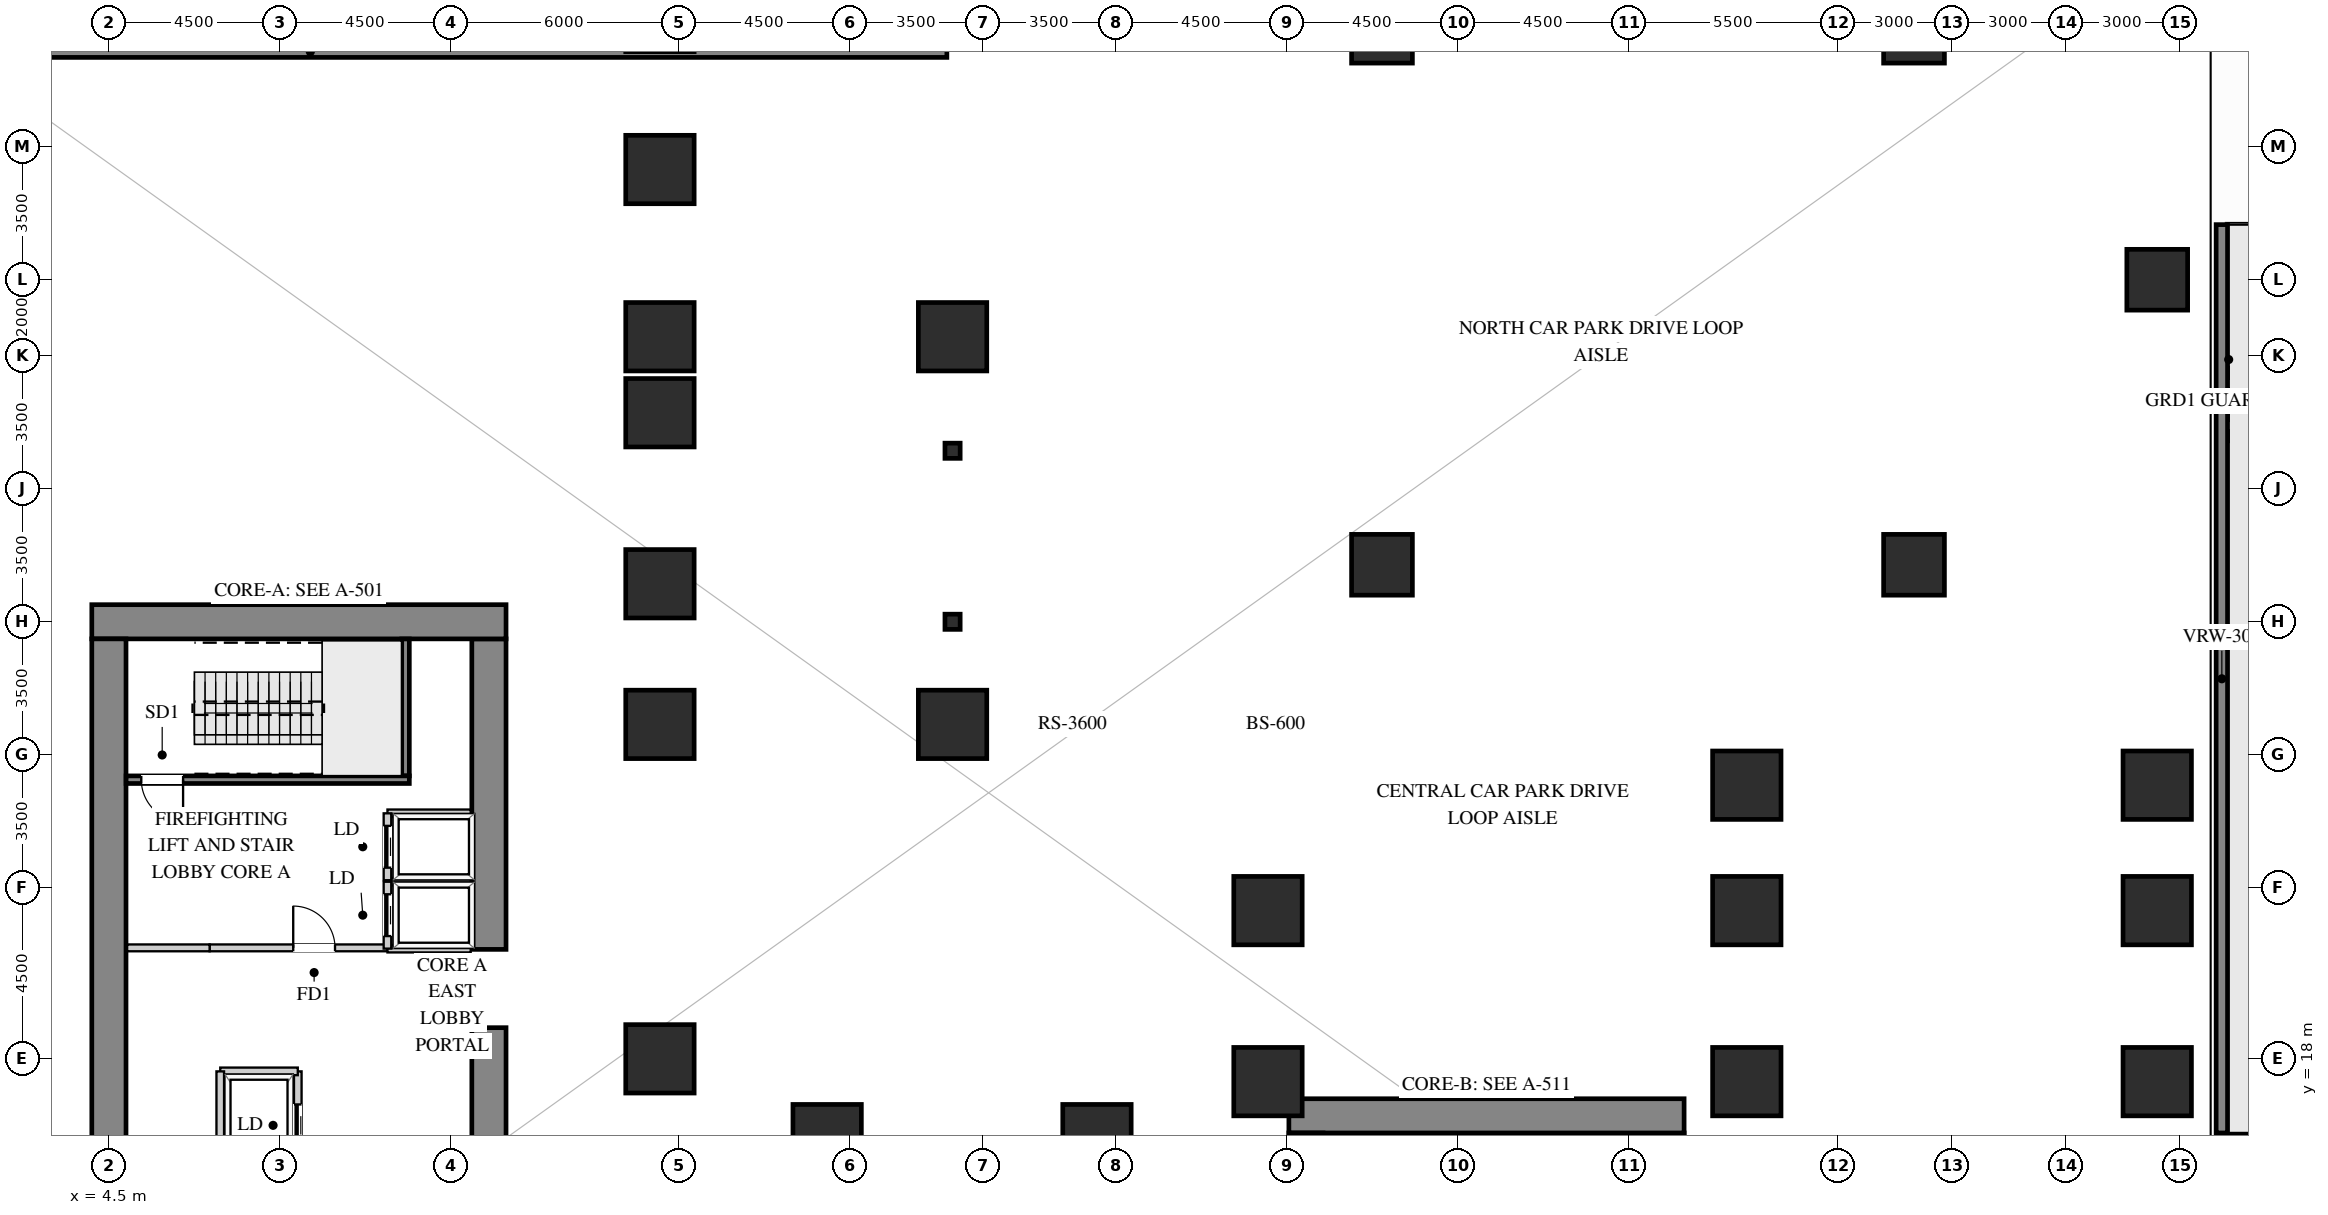
"""IFC4 building model, lengths in metres.
Left out: names, types, materials, properties, quantities, classifications, styles, units other than length and angle.
Written with IfcOpenShell. Run it as: python <this file> out.ifc"""

import sys

from ifc_helpers import new_model, si_unit, direction, frame, frame_2d, origin, origin_2d, place, context, subcontext, project, spatial, rectangle, hollow_rectangle, extrude, source, transform, mapped, element, fill, save


model = new_model("IFC4")
c1 = context("Model", 3, precision=1e-05, world=origin(), true_north=direction((0.0, 1.0)))
c2 = subcontext(c1, "Body", "Model", "MODEL_VIEW")
j1 = project(units=[si_unit("LENGTHUNIT", "METRE"), si_unit("PLANEANGLEUNIT", "RADIAN")], contexts=[c1])
p1 = place(None, origin())
s1 = spatial("IfcSite", under=j1, at=p1, CompositionType="ELEMENT")
p2 = place(p1, origin())
s2 = spatial("IfcBuilding", under=s1, at=p2, CompositionType="ELEMENT")
p3 = place(p2, frame((0.0, 0.0, -9.0)))
s3 = spatial("IfcBuildingStorey", under=s2, at=p3, CompositionType="ELEMENT", Elevation=-9.0)
m1 = source(origin(), c2, "Body", "SweptSolid", [
    extrude(rectangle(XDim=1.6, YDim=1.6, at=origin_2d()), origin(), (0.0, 0.0, 1.0), 4.2),
])
for number, where, z_axis, x_axis in (
    (1, (38.0, 31.0, 0.0), (0.0, 0.0, 1.0), (1.0, 0.0, 0.0)),
    (2, (52.0, 31.0, 0.0), (0.0, 0.0, 1.0), (1.0, 0.0, 0.0)),
    (3, (38.0, 45.0, 0.0), (0.0, 0.0, 1.0), (1.0, 0.0, 0.0)),
    (4, (52.0, 45.0, 0.0), (0.0, 0.0, 1.0), (1.0, 0.0, 0.0)),
    (5, (58.4, 38.5, 0.0), (0.0, 0.0, 1.0), (1.0, 0.0, 0.0)),
):
    element("IfcColumn", number, at=place(p3, frame(where, z_axis=z_axis, x_axis=x_axis)), inside=s3, PredefinedType="COLUMN", context=c2, shape_type="MappedRepresentation", body=[
        mapped(m1, transform((0.0, 0.0, 0.0), x_axis=(1.0, 0.0, 0.0), y_axis=(0.0, 1.0, 0.0), z_axis=(0.0, 0.0, 1.0))),
    ])
m2 = source(origin(), c2, "Body", "SweptSolid", [
    extrude(rectangle(XDim=1.8, YDim=1.8, at=origin_2d()), origin(), (0.0, 0.0, 1.0), 4.2),
])
for number, where, z_axis, x_axis in (
    (6, (26.7, 26.8, 0.0), (0.0, 0.0, 1.0), (1.0, 0.0, 0.0)),
    (7, (26.7, 37.0, 0.0), (0.0, 0.0, 1.0), (1.0, 0.0, 0.0)),
    (8, (58.4, 17.4, 0.0), (0.0, 0.0, 1.0), (1.0, 0.0, 0.0)),
    (9, (58.4, 21.9, 0.0), (0.0, 0.0, 1.0), (1.0, 0.0, 0.0)),
    (10, (58.4, 25.2, 0.0), (0.0, 0.0, 1.0), (1.0, 0.0, 0.0)),
    (11, (47.6, 17.4, 0.0), (0.0, 0.0, 1.0), (1.0, 0.0, 0.0)),
    (12, (47.6, 21.9, 0.0), (0.0, 0.0, 1.0), (1.0, 0.0, 0.0)),
    (13, (47.6, 25.2, 0.0), (0.0, 0.0, 1.0), (1.0, 0.0, 0.0)),
    (14, (19.0, 18.0, 0.0), (0.0, 0.0, 1.0), (1.0, 0.0, 0.0)),
    (15, (19.0, 26.8, 0.0), (0.0, 0.0, 1.0), (1.0, 0.0, 0.0)),
    (16, (19.0, 30.5, 0.0), (0.0, 0.0, 1.0), (1.0, 0.0, 0.0)),
    (17, (19.0, 35.0, 0.0), (0.0, 0.0, 1.0), (1.0, 0.0, 0.0)),
    (18, (19.0, 37.0, 0.0), (0.0, 0.0, 1.0), (1.0, 0.0, 0.0)),
    (19, (19.0, 41.4, 0.0), (0.0, 0.0, 1.0), (1.0, 0.0, 0.0)),
    (20, (19.0, 45.4, 0.0), (0.0, 0.0, 1.0), (1.0, 0.0, 0.0)),
    (21, (35.0, 17.4, 0.0), (0.0, 0.0, 1.0), (1.0, 0.0, 0.0)),
    (22, (35.0, 21.9, 0.0), (0.0, 0.0, 1.0), (1.0, 0.0, 0.0)),
    (23, (23.4, 15.9, 0.0), (0.0, 0.0, 1.0), (1.0, 0.0, 0.0)),
    (24, (30.5, 15.9, 0.0), (0.0, 0.0, 1.0), (1.0, 0.0, 0.0)),
):
    element("IfcColumn", number, at=place(p3, frame(where, z_axis=z_axis, x_axis=x_axis)), inside=s3, PredefinedType="COLUMN", context=c2, shape_type="MappedRepresentation", body=[
        mapped(m2, transform((0.0, 0.0, 0.0), x_axis=(1.0, 0.0, 0.0), y_axis=(0.0, 1.0, 0.0), z_axis=(0.0, 0.0, 1.0))),
    ])
m3 = source(origin(), c2, "Body", "SweptSolid", [
    extrude(hollow_rectangle(XDim=0.4, YDim=0.4, WallThickness=0.02, at=origin_2d()), origin(), (0.0, 0.0, 1.0), 4.2),
])
for number, where, z_axis, x_axis in (
    (25, (26.7, 29.5, 0.0), (0.0, 0.0, 1.0), (1.0, 0.0, 0.0)),
    (26, (26.7, 34.0, 0.0), (0.0, 0.0, 1.0), (1.0, 0.0, 0.0)),
):
    element("IfcColumn", number, at=place(p3, frame(where, z_axis=z_axis, x_axis=x_axis)), inside=s3, PredefinedType="PILASTER", context=c2, shape_type="MappedRepresentation", body=[
        mapped(m3, transform((0.0, 0.0, 0.0), x_axis=(1.0, 0.0, 0.0), y_axis=(0.0, 1.0, 0.0), z_axis=(0.0, 0.0, 1.0))),
    ])
m4 = source(origin(), c2, "Body", "SweptSolid", [
    extrude(rectangle(XDim=9.87, YDim=0.9, at=frame_2d((4.935, 0.0))), origin(), (0.0, 0.0, 1.0), 4.2),
])
p4 = place(p3, frame((14.5, 8.95, 0.0), z_axis=(0.0, 0.0, 1.0), x_axis=(0.0, 1.0, 0.0)))
e27 = element("IfcWall", 27, at=p4, inside=s3, PredefinedType="SHEAR", context=c2, shape_type="MappedRepresentation", body=[
    mapped(m4, transform((0.0, 0.0, 0.0), x_axis=(1.0, 0.0, 0.0), y_axis=(0.0, 1.0, 0.0), z_axis=(0.0, 0.0, 1.0))),
])
m5 = source(origin(), c2, "Body", "SweptSolid", [
    extrude(rectangle(XDim=8.17, YDim=0.9, at=frame_2d((4.085, 0.0))), origin(), (0.0, 0.0, 1.0), 4.2),
])
p5 = place(p3, frame((14.5, 20.88, 0.0), z_axis=(0.0, 0.0, 1.0), x_axis=(0.0, 1.0, 0.0)))
e28 = element("IfcWall", 28, at=p5, inside=s3, PredefinedType="SHEAR", context=c2, shape_type="MappedRepresentation", body=[
    mapped(m5, transform((0.0, 0.0, 0.0), x_axis=(1.0, 0.0, 0.0), y_axis=(0.0, 1.0, 0.0), z_axis=(0.0, 0.0, 1.0))),
])
m6 = source(origin(), c2, "Body", "SweptSolid", [
    extrude(rectangle(XDim=10.9, YDim=0.9, at=frame_2d((5.45, 0.0))), origin(), (0.0, 0.0, 1.0), 4.2),
])
p6 = place(p3, frame((4.05, 29.5, 0.0), z_axis=(0.0, 0.0, 1.0), x_axis=(1.0, 0.0, 0.0)))
e29 = element("IfcWall", 29, at=p6, inside=s3, PredefinedType="SHEAR", context=c2, shape_type="MappedRepresentation", body=[
    mapped(m6, transform((0.0, 0.0, 0.0), x_axis=(1.0, 0.0, 0.0), y_axis=(0.0, 1.0, 0.0), z_axis=(0.0, 0.0, 1.0))),
])
m7 = source(origin(), c2, "Body", "SweptSolid", [
    extrude(rectangle(XDim=20.1, YDim=0.9, at=frame_2d((10.05, 0.0))), origin(), (0.0, 0.0, 1.0), 4.2),
])
p7 = place(p3, frame((4.5, 8.95, 0.0), z_axis=(0.0, 0.0, 1.0), x_axis=(0.0, 1.0, 0.0)))
e30 = element("IfcWall", 30, at=p7, inside=s3, PredefinedType="SHEAR", context=c2, shape_type="MappedRepresentation", body=[
    mapped(m7, transform((0.0, 0.0, 0.0), x_axis=(1.0, 0.0, 0.0), y_axis=(0.0, 1.0, 0.0), z_axis=(0.0, 0.0, 1.0))),
])
m8 = source(origin(), c2, "Body", "SweptSolid", [
    extrude(rectangle(XDim=3.65, YDim=0.9, at=frame_2d((1.825, 0.0))), origin(), (0.0, 0.0, 1.0), 4.2),
])
p8 = place(p3, frame((45.5, 12.4, 0.0), z_axis=(0.0, 0.0, 1.0), x_axis=(0.0, 1.0, 0.0)))
e31 = element("IfcWall", 31, at=p8, inside=s3, PredefinedType="SHEAR", context=c2, shape_type="MappedRepresentation", body=[
    mapped(m8, transform((0.0, 0.0, 0.0), x_axis=(1.0, 0.0, 0.0), y_axis=(0.0, 1.0, 0.0), z_axis=(0.0, 0.0, 1.0))),
])
m9 = source(origin(), c2, "Body", "SweptSolid", [
    extrude(rectangle(XDim=10.4, YDim=0.9, at=frame_2d((5.2, 0.0))), origin(), (0.0, 0.0, 1.0), 4.2),
])
p9 = place(p3, frame((35.55, 16.5, 0.0), z_axis=(0.0, 0.0, 1.0), x_axis=(1.0, 0.0, 0.0)))
e32 = element("IfcWall", 32, at=p9, inside=s3, PredefinedType="SHEAR", context=c2, shape_type="MappedRepresentation", body=[
    mapped(m9, transform((0.0, 0.0, 0.0), x_axis=(1.0, 0.0, 0.0), y_axis=(0.0, 1.0, 0.0), z_axis=(0.0, 0.0, 1.0))),
])
p10 = place(p3, frame((36.0, 12.4, 0.0), z_axis=(0.0, 0.0, 1.0), x_axis=(0.0, 1.0, 0.0)))
e33 = element("IfcWall", 33, at=p10, inside=s3, PredefinedType="SHEAR", context=c2, shape_type="MappedRepresentation", body=[
    mapped(m8, transform((0.0, 0.0, 0.0), x_axis=(1.0, 0.0, 0.0), y_axis=(0.0, 1.0, 0.0), z_axis=(0.0, 0.0, 1.0))),
])
p11 = place(p3, frame((7.15, 20.92, 0.0), z_axis=(0.0, 0.0, 1.0), x_axis=(1.0, 0.0, 0.0)))
e34 = element("IfcWall", 34, at=p11, inside=s3, PredefinedType="PARTITIONING", context=c2, shape_type="SweptSolid", body=[
    extrude(rectangle(XDim=4.68, YDim=0.18, at=frame_2d((2.34, 0.0))), origin(), (0.0, 0.0, 1.0), 4.185),
])
p12 = place(p11, frame((2.2, 0.0, 0.0)))
e35 = element("IfcOpeningElement", 35, at=p12, cuts=e34, PredefinedType="OPENING", context=c2, shape_type="SweptSolid", body=[
    extrude(rectangle(XDim=1.1, YDim=2.15, at=frame_2d((0.55, 1.075))), frame((0.0, 0.1, 0.0), z_axis=(0.0, -1.0, 0.0), x_axis=(1.0, 0.0, 0.0)), (0.0, 0.0, 1.0), 0.2),
])
m10 = source(origin(), c2, "Body", "SweptSolid", [
    extrude(rectangle(XDim=2.17, YDim=0.18, at=frame_2d((1.085, 0.0))), origin(), (0.0, 0.0, 1.0), 4.185),
])
p13 = place(p3, frame((4.98, 20.92, 0.0), z_axis=(0.0, 0.0, 1.0), x_axis=(1.0, 0.0, 0.0)))
e36 = element("IfcWall", 36, at=p13, inside=s3, PredefinedType="PARTITIONING", context=c2, shape_type="MappedRepresentation", body=[
    mapped(m10, transform((0.0, 0.0, 0.0), x_axis=(1.0, 0.0, 0.0), y_axis=(0.0, 1.0, 0.0), z_axis=(0.0, 0.0, 1.0))),
])
m11 = source(origin(), c2, "Body", "SweptSolid", [
    extrude(rectangle(XDim=2.19, YDim=0.2, at=frame_2d((1.095, 0.0))), origin(), (0.0, 0.0, 1.0), 4.185),
])
for number, where, z_axis, x_axis in (
    (37, (11.83, 22.66, 0.0), (0.0, 0.0, 1.0), (1.0, 0.0, 0.0)),
    (38, (11.83, 20.9, 0.0), (0.0, 0.0, 1.0), (1.0, 0.0, 0.0)),
):
    element("IfcWall", number, at=place(p3, frame(where, z_axis=z_axis, x_axis=x_axis)), inside=s3, PredefinedType="PARTITIONING", context=c2, shape_type="MappedRepresentation", body=[
        mapped(m11, transform((0.0, 0.0, 0.0), x_axis=(1.0, 0.0, 0.0), y_axis=(0.0, 1.0, 0.0), z_axis=(0.0, 0.0, 1.0))),
    ])
p14 = place(p3, frame((11.83, 20.9, 0.0), z_axis=(0.0, 0.0, 1.0), x_axis=(0.0, 1.0, 0.0)))
e39 = element("IfcWall", 39, at=p14, inside=s3, PredefinedType="PARTITIONING", context=c2, shape_type="SweptSolid", body=[
    extrude(rectangle(XDim=1.76, YDim=0.2, at=frame_2d((0.88, 0.0))), origin(), (0.0, 0.0, 1.0), 4.185),
])
p15 = place(p14, frame((0.33, 0.0, 0.0)))
e40 = element("IfcOpeningElement", 40, at=p15, cuts=e39, PredefinedType="OPENING", context=c2, shape_type="SweptSolid", body=[
    extrude(rectangle(XDim=1.1, YDim=2.2, at=frame_2d((0.55, 1.1))), frame((0.0, 0.11, 0.0), z_axis=(0.0, -1.0, 0.0), x_axis=(1.0, 0.0, 0.0)), (0.0, 0.0, 1.0), 0.22),
])
p16 = place(p3, frame((11.83, 24.46, 0.0), z_axis=(0.0, 0.0, 1.0), x_axis=(1.0, 0.0, 0.0)))
e41 = element("IfcWall", 41, at=p16, inside=s3, PredefinedType="PARTITIONING", context=c2, shape_type="MappedRepresentation", body=[
    mapped(m11, transform((0.0, 0.0, 0.0), x_axis=(1.0, 0.0, 0.0), y_axis=(0.0, 1.0, 0.0), z_axis=(0.0, 0.0, 1.0))),
])
p17 = place(p3, frame((11.83, 22.7, 0.0), z_axis=(0.0, 0.0, 1.0), x_axis=(0.0, 1.0, 0.0)))
e42 = element("IfcWall", 42, at=p17, inside=s3, PredefinedType="PARTITIONING", context=c2, shape_type="SweptSolid", body=[
    extrude(rectangle(XDim=1.76, YDim=0.2, at=frame_2d((0.88, 0.0))), origin(), (0.0, 0.0, 1.0), 4.185),
])
p18 = place(p17, frame((0.33, 0.0, 0.0)))
e43 = element("IfcOpeningElement", 43, at=p18, cuts=e42, PredefinedType="OPENING", context=c2, shape_type="SweptSolid", body=[
    extrude(rectangle(XDim=1.1, YDim=2.2, at=frame_2d((0.55, 1.1))), frame((0.0, 0.11, 0.0), z_axis=(0.0, -1.0, 0.0), x_axis=(1.0, 0.0, 0.0)), (0.0, 0.0, 1.0), 0.22),
])
p19 = place(p3, frame((9.47, 14.83, 0.0), z_axis=(0.0, 0.0, 1.0), x_axis=(0.0, 1.0, 0.0)))
e44 = element("IfcWall", 44, at=p19, inside=s3, PredefinedType="PARTITIONING", context=c2, shape_type="SweptSolid", body=[
    extrude(rectangle(XDim=2.84, YDim=0.2, at=frame_2d((1.42, 0.0))), origin(), (0.0, 0.0, 1.0), 4.185),
])
p20 = place(p19, frame((0.87, 0.0, 0.0)))
e45 = element("IfcOpeningElement", 45, at=p20, cuts=e44, PredefinedType="OPENING", context=c2, shape_type="SweptSolid", body=[
    extrude(rectangle(XDim=1.1, YDim=2.2, at=frame_2d((0.55, 1.1))), frame((0.0, 0.11, 0.0), z_axis=(0.0, -1.0, 0.0), x_axis=(1.0, 0.0, 0.0)), (0.0, 0.0, 1.0), 0.22),
])
m12 = source(origin(), c2, "Body", "SweptSolid", [
    extrude(rectangle(XDim=2.04, YDim=0.2, at=frame_2d((1.02, 0.0))), origin(), (0.0, 0.0, 1.0), 4.185),
])
p21 = place(p3, frame((7.43, 17.67, 0.0), z_axis=(0.0, 0.0, 1.0), x_axis=(1.0, 0.0, 0.0)))
e46 = element("IfcWall", 46, at=p21, inside=s3, PredefinedType="PARTITIONING", context=c2, shape_type="MappedRepresentation", body=[
    mapped(m12, transform((0.0, 0.0, 0.0), x_axis=(1.0, 0.0, 0.0), y_axis=(0.0, 1.0, 0.0), z_axis=(0.0, 0.0, 1.0))),
])
m13 = source(origin(), c2, "Body", "SweptSolid", [
    extrude(rectangle(XDim=2.84, YDim=0.2, at=frame_2d((1.42, 0.0))), origin(), (0.0, 0.0, 1.0), 4.185),
])
p22 = place(p3, frame((7.43, 14.83, 0.0), z_axis=(0.0, 0.0, 1.0), x_axis=(0.0, 1.0, 0.0)))
e47 = element("IfcWall", 47, at=p22, inside=s3, PredefinedType="PARTITIONING", context=c2, shape_type="MappedRepresentation", body=[
    mapped(m13, transform((0.0, 0.0, 0.0), x_axis=(1.0, 0.0, 0.0), y_axis=(0.0, 1.0, 0.0), z_axis=(0.0, 0.0, 1.0))),
])
m14 = source(origin(), c2, "Body", "SweptSolid", [
    extrude(rectangle(XDim=3.603, YDim=0.2, at=frame_2d((1.802, 0.0))), origin(), (0.0, 0.0, 1.0), 4.2),
])
p23 = place(p3, frame((12.305, 25.445, 0.0), z_axis=(0.0, 0.0, 1.0), x_axis=(0.0, 1.0, 0.0)))
e48 = element("IfcWall", 48, at=p23, inside=s3, PredefinedType="SHEAR", context=c2, shape_type="MappedRepresentation", body=[
    mapped(m14, transform((0.0, 0.0, 0.0), x_axis=(1.0, 0.0, 0.0), y_axis=(0.0, 1.0, 0.0), z_axis=(0.0, 0.0, 1.0))),
])
p24 = place(p3, frame((4.952, 25.345, 0.0), z_axis=(0.0, 0.0, 1.0), x_axis=(1.0, 0.0, 0.0)))
e49 = element("IfcWall", 49, at=p24, inside=s3, PredefinedType="SHEAR", context=c2, shape_type="SweptSolid", body=[
    extrude(rectangle(XDim=7.453, YDim=0.2, at=frame_2d((3.727, 0.0))), origin(), (0.0, 0.0, 1.0), 4.2),
])
p25 = place(p24, frame((0.4, 0.0, 0.0)))
e50 = element("IfcOpeningElement", 50, at=p25, cuts=e49, PredefinedType="OPENING", context=c2, shape_type="SweptSolid", body=[
    extrude(rectangle(XDim=1.1, YDim=2.15, at=frame_2d((0.55, 1.075))), frame((0.0, 0.11, 0.0), z_axis=(0.0, -1.0, 0.0), x_axis=(1.0, 0.0, 0.0)), (0.0, 0.0, 1.0), 0.22),
])
m15 = source(origin(), c2, "Body", "SweptSolid", [
    extrude(rectangle(XDim=23.9, YDim=0.3, at=frame_2d((11.95, 0.0))), origin(), (0.0, 0.0, 1.0), 4.2),
])
p26 = place(p3, frame((60.1, 16.05, 0.0), z_axis=(0.0, 0.0, 1.0), x_axis=(0.0, 1.0, 0.0)))
e51 = element("IfcWall", 51, at=p26, inside=s3, PredefinedType="SHEAR", context=c2, shape_type="MappedRepresentation", body=[
    mapped(m15, transform((0.0, 0.0, 0.0), x_axis=(1.0, 0.0, 0.0), y_axis=(0.0, 1.0, 0.0), z_axis=(0.0, 0.0, 1.0))),
])
m16 = source(origin(), c2, "Body", "SweptSolid", [
    extrude(rectangle(XDim=34.3, YDim=0.3, at=frame_2d((17.15, 0.0))), origin(), (0.0, 0.0, 1.0), 4.2),
])
p27 = place(p3, frame((-7.75, 44.5, 0.0), z_axis=(0.0, 0.0, 1.0), x_axis=(1.0, 0.0, 0.0)))
e52 = element("IfcWall", 52, at=p27, inside=s3, PredefinedType="SHEAR", context=c2, shape_type="MappedRepresentation", body=[
    mapped(m16, transform((0.0, 0.0, 0.0), x_axis=(1.0, 0.0, 0.0), y_axis=(0.0, 1.0, 0.0), z_axis=(0.0, 0.0, 1.0))),
])
m17 = source(origin(), c2, "Body", "SweptSolid", [
    extrude(rectangle(XDim=1.1, YDim=2.15, at=frame_2d((0.55, 1.075))), frame((0.0, 0.025, 0.0), z_axis=(0.0, -1.0, 0.0), x_axis=(1.0, 0.0, 0.0)), (0.0, 0.0, 1.0), 0.05),
])
p28 = place(p12, origin())
e53 = element("IfcDoor", 53, at=p28, inside=s3, OperationType="SINGLE_SWING_LEFT", PredefinedType="DOOR", context=c2, shape_type="MappedRepresentation", body=[
    mapped(m17, transform((0.0, 0.0, 0.0), x_axis=(1.0, 0.0, 0.0), y_axis=(0.0, 1.0, 0.0), z_axis=(0.0, 0.0, 1.0))),
])
fill(e35, e53)
m18 = source(origin(), c2, "Body", "SweptSolid", [
    extrude(rectangle(XDim=1.1, YDim=2.2, at=frame_2d((0.55, 1.1))), frame((0.0, 0.025, 0.0), z_axis=(0.0, -1.0, 0.0), x_axis=(1.0, 0.0, 0.0)), (0.0, 0.0, 1.0), 0.05),
])
p29 = place(p15, origin())
e54 = element("IfcDoor", 54, at=p29, inside=s3, OperationType="SLIDING_TO_LEFT", PredefinedType="DOOR", context=c2, shape_type="MappedRepresentation", body=[
    mapped(m18, transform((0.0, 0.0, 0.0), x_axis=(1.0, 0.0, 0.0), y_axis=(0.0, 1.0, 0.0), z_axis=(0.0, 0.0, 1.0))),
])
fill(e40, e54)
p30 = place(p18, origin())
e55 = element("IfcDoor", 55, at=p30, inside=s3, OperationType="SLIDING_TO_LEFT", PredefinedType="DOOR", context=c2, shape_type="MappedRepresentation", body=[
    mapped(m18, transform((0.0, 0.0, 0.0), x_axis=(1.0, 0.0, 0.0), y_axis=(0.0, 1.0, 0.0), z_axis=(0.0, 0.0, 1.0))),
])
fill(e43, e55)
p31 = place(p20, origin())
e56 = element("IfcDoor", 56, at=p31, inside=s3, OperationType="SLIDING_TO_LEFT", PredefinedType="DOOR", context=c2, shape_type="MappedRepresentation", body=[
    mapped(m18, transform((0.0, 0.0, 0.0), x_axis=(1.0, 0.0, 0.0), y_axis=(0.0, 1.0, 0.0), z_axis=(0.0, 0.0, 1.0))),
])
fill(e45, e56)
m19 = source(origin(), c2, "Body", "SweptSolid", [
    extrude(rectangle(XDim=1.1, YDim=2.15, at=frame_2d((0.55, 1.075))), frame((0.0, 0.025, 0.0), z_axis=(0.0, -1.0, 0.0), x_axis=(1.0, 0.0, 0.0)), (0.0, 0.0, 1.0), 0.05),
])
p32 = place(p25, origin())
e57 = element("IfcDoor", 57, at=p32, inside=s3, OperationType="SINGLE_SWING_RIGHT", PredefinedType="DOOR", context=c2, shape_type="MappedRepresentation", body=[
    mapped(m19, transform((0.0, 0.0, 0.0), x_axis=(1.0, 0.0, 0.0), y_axis=(0.0, 1.0, 0.0), z_axis=(0.0, 0.0, 1.0))),
])
fill(e50, e57)
save(model, sys.argv[1])
